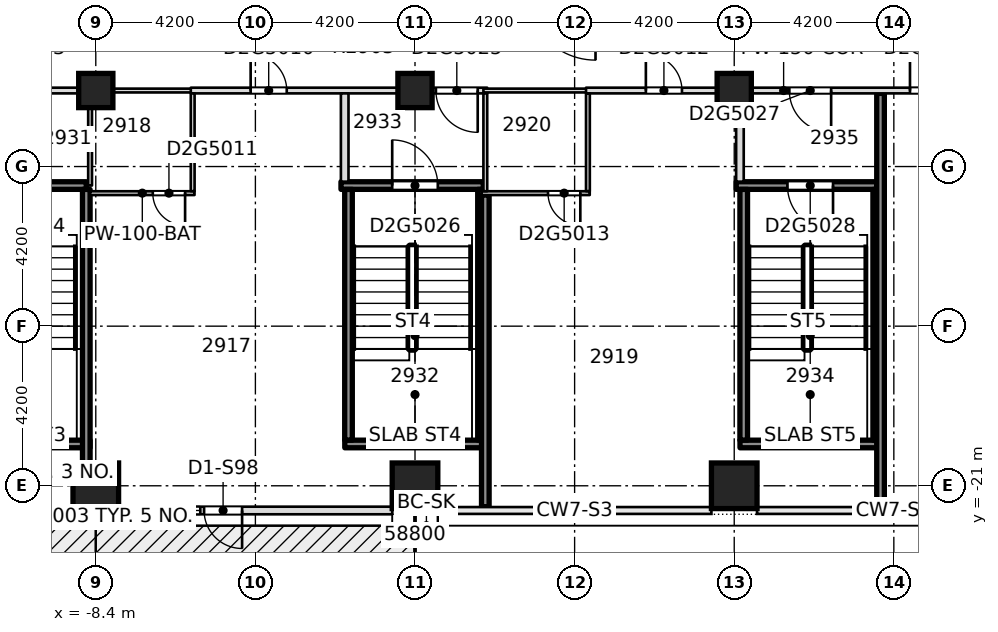
"""IFC4 building model, lengths in metres.
Left out: names, types, materials, properties, quantities, classifications, styles, units other than length and angle.
Written with IfcOpenShell. Run it as: python <this file> out.ifc"""

import sys

from ifc_helpers import new_model, si_unit, direction, frame, frame_2d, origin, origin_2d, place, context, subcontext, project, spatial, rectangle, extrude, element, fill, save


model = new_model("IFC4")
c1 = context("Model", 3, precision=1e-05, world=origin(), true_north=direction((0.0, 1.0)))
c2 = subcontext(c1, "Body", "Model", "MODEL_VIEW")
j1 = project(units=[si_unit("LENGTHUNIT", "METRE"), si_unit("PLANEANGLEUNIT", "RADIAN")], contexts=[c1])
p1 = place(None, origin())
s1 = spatial("IfcSite", under=j1, at=p1, CompositionType="ELEMENT")
p2 = place(p1, origin())
s2 = spatial("IfcBuilding", under=s1, at=p2, CompositionType="ELEMENT")
p3 = place(p2, frame((0.0, 0.0, 114.9)))
s3 = spatial("IfcBuildingStorey", under=s2, at=p3, CompositionType="ELEMENT", Elevation=114.9)
for number, where, z_axis, x_axis in (
    (1, (-8.4, -21.0, -0.32), (0.0, 0.0, 1.0), (1.0, 0.0, 0.0)),
    (2, (0.0, -21.0, -0.32), (0.0, 0.0, 1.0), (1.0, 0.0, 0.0)),
    (3, (8.4, -21.0, -0.32), (0.0, 0.0, 1.0), (1.0, 0.0, 0.0)),
):
    element("IfcColumn", number, at=place(p3, frame(where, z_axis=z_axis, x_axis=x_axis)), inside=s3, PredefinedType="COLUMN", context=c2, shape_type="SweptSolid", body=[
        extrude(rectangle(XDim=1.2, YDim=1.2, at=origin_2d()), origin(), (0.0, 0.0, 1.0), 3.45),
    ])
for number, where, z_axis, x_axis in (
    (4, (-8.4, -10.6, -0.32), (0.0, 0.0, 1.0), (1.0, 0.0, 0.0)),
    (5, (0.0, -10.6, -0.32), (0.0, 0.0, 1.0), (1.0, 0.0, 0.0)),
    (6, (8.4, -10.6, -0.32), (0.0, 0.0, 1.0), (1.0, 0.0, 0.0)),
):
    element("IfcColumn", number, at=place(p3, frame(where, z_axis=z_axis, x_axis=x_axis)), inside=s3, PredefinedType="COLUMN", context=c2, shape_type="SweptSolid", body=[
        extrude(rectangle(XDim=0.9, YDim=0.9, at=origin_2d()), origin(), (0.0, 0.0, 1.0), 3.45),
    ])
p4 = place(p3, frame((-1.848, -19.9, 0.0), z_axis=(0.0, 0.0, 1.0), x_axis=(1.0, 0.0, 0.0)))
e7 = element("IfcWall", 7, at=p4, inside=s3, PredefinedType="SOLIDWALL", context=c2, shape_type="SweptSolid", body=[
    extrude(rectangle(XDim=3.696, YDim=0.2, at=frame_2d((1.848, 0.0))), origin(), (0.0, 0.0, 1.0), 3.13),
])
p5 = place(p3, frame((8.552, -19.9, 0.0), z_axis=(0.0, 0.0, 1.0), x_axis=(1.0, 0.0, 0.0)))
e8 = element("IfcWall", 8, at=p5, inside=s3, PredefinedType="SOLIDWALL", context=c2, shape_type="SweptSolid", body=[
    extrude(rectangle(XDim=3.696, YDim=0.2, at=frame_2d((1.848, 0.0))), origin(), (0.0, 0.0, 1.0), 3.13),
])
p6 = place(p3, frame((-8.55, -13.3, 0.0), z_axis=(0.0, 0.0, 1.0), x_axis=(1.0, 0.0, 0.0)))
e9 = element("IfcWall", 9, at=p6, inside=s3, PredefinedType="PARTITIONING", context=c2, shape_type="SweptSolid", body=[
    extrude(rectangle(XDim=2.748, YDim=0.1, at=frame_2d((1.374, 0.0))), origin(), (0.0, 0.0, 1.0), 3.13),
])
p7 = place(p6, frame((1.65, 0.0, 0.0)))
e10 = element("IfcOpeningElement", 10, at=p7, cuts=e9, PredefinedType="OPENING", context=c2, shape_type="SweptSolid", body=[
    extrude(rectangle(XDim=0.85, YDim=2.1, at=frame_2d((0.425, 1.05))), frame((0.0, 0.06, 0.0), z_axis=(0.0, -1.0, 0.0), x_axis=(1.0, 0.0, 0.0)), (0.0, 0.0, 1.0), 0.12),
])
p8 = place(p3, frame((1.75, -13.3, 0.0), z_axis=(0.0, 0.0, 1.0), x_axis=(1.0, 0.0, 0.0)))
e11 = element("IfcWall", 11, at=p8, inside=s3, PredefinedType="PARTITIONING", context=c2, shape_type="SweptSolid", body=[
    extrude(rectangle(XDim=2.848, YDim=0.1, at=frame_2d((1.424, 0.0))), origin(), (0.0, 0.0, 1.0), 3.13),
])
p9 = place(p8, frame((1.75, 0.0, 0.0)))
e12 = element("IfcOpeningElement", 12, at=p9, cuts=e11, PredefinedType="OPENING", context=c2, shape_type="SweptSolid", body=[
    extrude(rectangle(XDim=0.85, YDim=2.1, at=frame_2d((0.425, 1.05))), frame((0.0, 0.06, 0.0), z_axis=(0.0, -1.0, 0.0), x_axis=(1.0, 0.0, 0.0)), (0.0, 0.0, 1.0), 0.12),
])
p10 = place(p3, frame((-12.15, -13.1, 0.0), z_axis=(0.0, 0.0, 1.0), x_axis=(1.0, 0.0, 0.0)))
e13 = element("IfcWall", 13, at=p10, inside=s3, PredefinedType="SOLIDWALL", context=c2, shape_type="SweptSolid", body=[
    extrude(rectangle(XDim=3.5, YDim=0.2, at=frame_2d((1.75, 0.0))), origin(), (0.0, 0.0, 1.0), 3.13),
])
p11 = place(p10, frame((1.15, 0.0, 0.0)))
e14 = element("IfcOpeningElement", 14, at=p11, cuts=e13, PredefinedType="OPENING", context=c2, shape_type="SweptSolid", body=[
    extrude(rectangle(XDim=1.2, YDim=2.1, at=frame_2d((0.6, 1.05))), frame((0.0, 0.11, 0.0), z_axis=(0.0, -1.0, 0.0), x_axis=(1.0, 0.0, 0.0)), (0.0, 0.0, 1.0), 0.22),
])
p12 = place(p3, frame((-1.948, -13.1, 0.0), z_axis=(0.0, 0.0, 1.0), x_axis=(1.0, 0.0, 0.0)))
e15 = element("IfcWall", 15, at=p12, inside=s3, PredefinedType="SOLIDWALL", context=c2, shape_type="SweptSolid", body=[
    extrude(rectangle(XDim=3.746, YDim=0.2, at=frame_2d((1.873, 0.0))), origin(), (0.0, 0.0, 1.0), 3.13),
])
p13 = place(p12, frame((1.348, 0.0, 0.0)))
e16 = element("IfcOpeningElement", 16, at=p13, cuts=e15, PredefinedType="OPENING", context=c2, shape_type="SweptSolid", body=[
    extrude(rectangle(XDim=1.2, YDim=2.1, at=frame_2d((0.6, 1.05))), frame((0.0, 0.11, 0.0), z_axis=(0.0, -1.0, 0.0), x_axis=(1.0, 0.0, 0.0)), (0.0, 0.0, 1.0), 0.22),
])
p14 = place(p3, frame((8.452, -13.1, 0.0), z_axis=(0.0, 0.0, 1.0), x_axis=(1.0, 0.0, 0.0)))
e17 = element("IfcWall", 17, at=p14, inside=s3, PredefinedType="SOLIDWALL", context=c2, shape_type="SweptSolid", body=[
    extrude(rectangle(XDim=3.696, YDim=0.2, at=frame_2d((1.848, 0.0))), origin(), (0.0, 0.0, 1.0), 3.13),
])
p15 = place(p14, frame((1.348, 0.0, 0.0)))
e18 = element("IfcOpeningElement", 18, at=p15, cuts=e17, PredefinedType="OPENING", context=c2, shape_type="SweptSolid", body=[
    extrude(rectangle(XDim=1.2, YDim=2.1, at=frame_2d((0.6, 1.05))), frame((0.0, 0.11, 0.0), z_axis=(0.0, -1.0, 0.0), x_axis=(1.0, 0.0, 0.0)), (0.0, 0.0, 1.0), 0.22),
])
p16 = place(p3, frame((-12.25, -10.6, 0.0), z_axis=(0.0, 0.0, 1.0), x_axis=(1.0, 0.0, 0.0)))
e19 = element("IfcWall", 19, at=p16, inside=s3, PredefinedType="PARTITIONING", context=c2, shape_type="SweptSolid", body=[
    extrude(rectangle(XDim=3.75, YDim=0.15, at=frame_2d((1.875, 0.0))), origin(), (0.0, 0.0, 1.0), 3.13),
])
p17 = place(p16, frame((1.3, 0.0, 0.0)))
e20 = element("IfcOpeningElement", 20, at=p17, cuts=e19, PredefinedType="OPENING", context=c2, shape_type="SweptSolid", body=[
    extrude(rectangle(XDim=1.1, YDim=2.1, at=frame_2d((0.55, 1.05))), frame((0.0, 0.085, 0.0), z_axis=(0.0, -1.0, 0.0), x_axis=(1.0, 0.0, 0.0)), (0.0, 0.0, 1.0), 0.17),
])
p18 = place(p3, frame((-8.6, -10.6, 0.0), z_axis=(0.0, 0.0, 1.0), x_axis=(1.0, 0.0, 0.0)))
e21 = element("IfcWall", 21, at=p18, inside=s3, PredefinedType="PARTITIONING", context=c2, shape_type="SweptSolid", body=[
    extrude(rectangle(XDim=2.8, YDim=0.1, at=frame_2d((1.4, 0.0))), origin(), (0.0, 0.0, 1.0), 3.13),
])
p19 = place(p3, frame((-5.9, -10.6, 0.0), z_axis=(0.0, 0.0, 1.0), x_axis=(1.0, 0.0, 0.0)))
e22 = element("IfcWall", 22, at=p19, inside=s3, PredefinedType="PARTITIONING", context=c2, shape_type="SweptSolid", body=[
    extrude(rectangle(XDim=7.8, YDim=0.15, at=frame_2d((3.9, 0.0))), origin(), (0.0, 0.0, 1.0), 3.13),
])
p20 = place(p19, frame((1.575, 0.0, 0.0)))
e23 = element("IfcOpeningElement", 23, at=p20, cuts=e22, PredefinedType="OPENING", context=c2, shape_type="SweptSolid", body=[
    extrude(rectangle(XDim=0.95, YDim=2.1, at=frame_2d((0.475, 1.05))), frame((0.0, 0.085, 0.0), z_axis=(0.0, -1.0, 0.0), x_axis=(1.0, 0.0, 0.0)), (0.0, 0.0, 1.0), 0.17),
])
p21 = place(p19, frame((6.45, 0.0, 0.0)))
e24 = element("IfcOpeningElement", 24, at=p21, cuts=e22, PredefinedType="OPENING", context=c2, shape_type="SweptSolid", body=[
    extrude(rectangle(XDim=1.1, YDim=2.1, at=frame_2d((0.55, 1.05))), frame((0.0, 0.085, 0.0), z_axis=(0.0, -1.0, 0.0), x_axis=(1.0, 0.0, 0.0)), (0.0, 0.0, 1.0), 0.17),
])
p22 = place(p3, frame((1.8, -10.6, 0.0), z_axis=(0.0, 0.0, 1.0), x_axis=(1.0, 0.0, 0.0)))
e25 = element("IfcWall", 25, at=p22, inside=s3, PredefinedType="PARTITIONING", context=c2, shape_type="SweptSolid", body=[
    extrude(rectangle(XDim=2.8, YDim=0.1, at=frame_2d((1.4, 0.0))), origin(), (0.0, 0.0, 1.0), 3.13),
])
p23 = place(p3, frame((4.5, -10.6, 0.0), z_axis=(0.0, 0.0, 1.0), x_axis=(1.0, 0.0, 0.0)))
e26 = element("IfcWall", 26, at=p23, inside=s3, PredefinedType="PARTITIONING", context=c2, shape_type="SweptSolid", body=[
    extrude(rectangle(XDim=10.4, YDim=0.15, at=frame_2d((5.2, 0.0))), origin(), (0.0, 0.0, 1.0), 3.13),
])
p24 = place(p23, frame((1.575, 0.0, 0.0)))
e27 = element("IfcOpeningElement", 27, at=p24, cuts=e26, PredefinedType="OPENING", context=c2, shape_type="SweptSolid", body=[
    extrude(rectangle(XDim=0.95, YDim=2.1, at=frame_2d((0.475, 1.05))), frame((0.0, 0.085, 0.0), z_axis=(0.0, -1.0, 0.0), x_axis=(1.0, 0.0, 0.0)), (0.0, 0.0, 1.0), 0.17),
])
p25 = place(p23, frame((5.35, 0.0, 0.0)))
e28 = element("IfcOpeningElement", 28, at=p25, cuts=e26, PredefinedType="OPENING", context=c2, shape_type="SweptSolid", body=[
    extrude(rectangle(XDim=1.1, YDim=2.1, at=frame_2d((0.55, 1.05))), frame((0.0, 0.085, 0.0), z_axis=(0.0, -1.0, 0.0), x_axis=(1.0, 0.0, 0.0)), (0.0, 0.0, 1.0), 0.17),
])
p26 = place(p23, frame((8.525, 0.0, 0.0)))
e29 = element("IfcOpeningElement", 29, at=p26, cuts=e26, PredefinedType="OPENING", context=c2, shape_type="SweptSolid", body=[
    extrude(rectangle(XDim=1.0, YDim=2.1, at=frame_2d((0.5, 1.05))), frame((0.0, 0.085, 0.0), z_axis=(0.0, -1.0, 0.0), x_axis=(1.0, 0.0, 0.0)), (0.0, 0.0, 1.0), 0.17),
])
p27 = place(p3, frame((-8.55, -13.1, 0.0), z_axis=(0.0, 0.0, 1.0), x_axis=(0.0, 1.0, 0.0)))
e30 = element("IfcWall", 30, at=p27, inside=s3, PredefinedType="PARTITIONING", context=c2, shape_type="SweptSolid", body=[
    extrude(rectangle(XDim=2.425, YDim=0.1, at=frame_2d((1.212, 0.0))), origin(), (0.0, 0.0, 1.0), 3.13),
])
p28 = place(p3, frame((-5.85, -13.248, 0.0), z_axis=(0.0, 0.0, 1.0), x_axis=(0.0, 1.0, 0.0)))
e31 = element("IfcWall", 31, at=p28, inside=s3, PredefinedType="PARTITIONING", context=c2, shape_type="SweptSolid", body=[
    extrude(rectangle(XDim=2.573, YDim=0.1, at=frame_2d((1.287, 0.0))), origin(), (0.0, 0.0, 1.0), 3.13),
])
p29 = place(p3, frame((-1.85, -12.998, 0.0), z_axis=(0.0, 0.0, 1.0), x_axis=(0.0, 1.0, 0.0)))
e32 = element("IfcWall", 32, at=p29, inside=s3, PredefinedType="PARTITIONING", context=c2, shape_type="SweptSolid", body=[
    extrude(rectangle(XDim=2.323, YDim=0.2, at=frame_2d((1.162, 0.0))), origin(), (0.0, 0.0, 1.0), 3.13),
])
for number, where, z_axis, x_axis in (
    (33, (-1.75, -19.798, 0.0), (0.0, 0.0, 1.0), (0.0, 1.0, 0.0)),
    (34, (1.75, -19.798, 0.0), (0.0, 0.0, 1.0), (0.0, 1.0, 0.0)),
):
    element("IfcWall", number, at=place(p3, frame(where, z_axis=z_axis, x_axis=x_axis)), inside=s3, PredefinedType="SOLIDWALL", context=c2, shape_type="SweptSolid", body=[
        extrude(rectangle(XDim=6.596, YDim=0.2, at=frame_2d((3.298, 0.0))), origin(), (0.0, 0.0, 1.0), 3.13),
    ])
p30 = place(p3, frame((1.85, -13.25, 0.0), z_axis=(0.0, 0.0, 1.0), x_axis=(0.0, 1.0, 0.0)))
e35 = element("IfcWall", 35, at=p30, inside=s3, PredefinedType="PARTITIONING", context=c2, shape_type="SweptSolid", body=[
    extrude(rectangle(XDim=2.575, YDim=0.1, at=frame_2d((1.288, 0.0))), origin(), (0.0, 0.0, 1.0), 3.13),
])
p31 = place(p3, frame((4.55, -13.248, 0.0), z_axis=(0.0, 0.0, 1.0), x_axis=(0.0, 1.0, 0.0)))
e36 = element("IfcWall", 36, at=p31, inside=s3, PredefinedType="PARTITIONING", context=c2, shape_type="SweptSolid", body=[
    extrude(rectangle(XDim=2.573, YDim=0.1, at=frame_2d((1.287, 0.0))), origin(), (0.0, 0.0, 1.0), 3.13),
])
p32 = place(p3, frame((8.55, -12.998, 0.0), z_axis=(0.0, 0.0, 1.0), x_axis=(0.0, 1.0, 0.0)))
e37 = element("IfcWall", 37, at=p32, inside=s3, PredefinedType="PARTITIONING", context=c2, shape_type="SweptSolid", body=[
    extrude(rectangle(XDim=2.323, YDim=0.2, at=frame_2d((1.162, 0.0))), origin(), (0.0, 0.0, 1.0), 3.13),
])
for number, where, z_axis, x_axis in (
    (38, (8.65, -19.798, 0.0), (0.0, 0.0, 1.0), (0.0, 1.0, 0.0)),
    (39, (12.15, -19.798, 0.0), (0.0, 0.0, 1.0), (0.0, 1.0, 0.0)),
):
    element("IfcWall", number, at=place(p3, frame(where, z_axis=z_axis, x_axis=x_axis)), inside=s3, PredefinedType="SOLIDWALL", context=c2, shape_type="SweptSolid", body=[
        extrude(rectangle(XDim=6.596, YDim=0.2, at=frame_2d((3.298, 0.0))), origin(), (0.0, 0.0, 1.0), 3.13),
    ])
p33 = place(p3, frame((-16.2, -21.65, 0.0), z_axis=(0.0, 0.0, 1.0), x_axis=(1.0, 0.0, 0.0)))
e40 = element("IfcWall", 40, at=p33, inside=s3, PredefinedType="STANDARD", context=c2, shape_type="SweptSolid", body=[
    extrude(rectangle(XDim=7.2, YDim=0.2, at=frame_2d((3.6, 0.0))), origin(), (0.0, 0.0, 1.0), 3.13),
])
p34 = place(p33, frame((0.35, 0.0, 0.2)))
e41 = element("IfcOpeningElement", 41, at=p34, cuts=e40, PredefinedType="OPENING", context=c2, shape_type="SweptSolid", body=[
    extrude(rectangle(XDim=1.8, YDim=2.65, at=frame_2d((0.9, 1.325))), frame((0.0, 0.11, 0.0), z_axis=(0.0, -1.0, 0.0), x_axis=(1.0, 0.0, 0.0)), (0.0, 0.0, 1.0), 0.22),
])
p35 = place(p33, frame((2.25, 0.0, 0.0)))
e42 = element("IfcOpeningElement", 42, at=p35, cuts=e40, PredefinedType="OPENING", context=c2, shape_type="SweptSolid", body=[
    extrude(rectangle(XDim=1.0, YDim=2.4, at=frame_2d((0.5, 1.2))), frame((0.0, 0.11, 0.0), z_axis=(0.0, -1.0, 0.0), x_axis=(1.0, 0.0, 0.0)), (0.0, 0.0, 1.0), 0.22),
])
p36 = place(p3, frame((-7.8, -21.65, 0.0), z_axis=(0.0, 0.0, 1.0), x_axis=(1.0, 0.0, 0.0)))
e43 = element("IfcWall", 43, at=p36, inside=s3, PredefinedType="STANDARD", context=c2, shape_type="SweptSolid", body=[
    extrude(rectangle(XDim=7.2, YDim=0.2, at=frame_2d((3.6, 0.0))), origin(), (0.0, 0.0, 1.0), 3.13),
])
p37 = place(p36, frame((0.35, 0.0, 0.2)))
e44 = element("IfcOpeningElement", 44, at=p37, cuts=e43, PredefinedType="OPENING", context=c2, shape_type="SweptSolid", body=[
    extrude(rectangle(XDim=1.8, YDim=2.65, at=frame_2d((0.9, 1.325))), frame((0.0, 0.11, 0.0), z_axis=(0.0, -1.0, 0.0), x_axis=(1.0, 0.0, 0.0)), (0.0, 0.0, 1.0), 0.22),
])
p38 = place(p36, frame((2.25, 0.0, 0.0)))
e45 = element("IfcOpeningElement", 45, at=p38, cuts=e43, PredefinedType="OPENING", context=c2, shape_type="SweptSolid", body=[
    extrude(rectangle(XDim=1.0, YDim=2.4, at=frame_2d((0.5, 1.2))), frame((0.0, 0.11, 0.0), z_axis=(0.0, -1.0, 0.0), x_axis=(1.0, 0.0, 0.0)), (0.0, 0.0, 1.0), 0.22),
])
p39 = place(p3, frame((-12.25, -19.9, 0.0), z_axis=(0.0, 0.0, 1.0), x_axis=(1.0, 0.0, 0.0)))
e46 = element("IfcWall", 46, at=p39, inside=s3, PredefinedType="SOLIDWALL", context=c2, shape_type="SweptSolid", body=[
    extrude(rectangle(XDim=3.7, YDim=0.2, at=frame_2d((1.85, 0.0))), origin(), (0.0, 0.0, 1.0), 3.13),
])
p40 = place(p3, frame((1.85, -21.55, 0.0), z_axis=(0.0, 0.0, 1.0), x_axis=(0.0, 1.0, 0.0)))
e47 = element("IfcWall", 47, at=p40, inside=s3, PredefinedType="SOLIDWALL", context=c2, shape_type="SweptSolid", body=[
    extrude(rectangle(XDim=8.2, YDim=0.2, at=frame_2d((4.1, 0.0))), origin(), (0.0, 0.0, 1.0), 3.13),
])
p41 = place(p3, frame((12.25, -21.55, 0.0), z_axis=(0.0, 0.0, 1.0), x_axis=(0.0, 1.0, 0.0)))
e48 = element("IfcWall", 48, at=p41, inside=s3, PredefinedType="SOLIDWALL", context=c2, shape_type="SweptSolid", body=[
    extrude(rectangle(XDim=10.875, YDim=0.2, at=frame_2d((5.438, 0.0))), origin(), (0.0, 0.0, 1.0), 3.13),
])
p42 = place(p3, frame((-8.65, -20.4, 0.0), z_axis=(0.0, 0.0, 1.0), x_axis=(0.0, 1.0, 0.0)))
e49 = element("IfcWall", 49, at=p42, inside=s3, PredefinedType="SOLIDWALL", context=c2, shape_type="SweptSolid", body=[
    extrude(rectangle(XDim=7.198, YDim=0.2, at=frame_2d((3.599, 0.0))), origin(), (0.0, 0.0, 1.0), 3.13),
])
p43 = place(p20, origin())
e50 = element("IfcDoor", 50, at=p43, inside=s3, OperationType="SINGLE_SWING_LEFT", PredefinedType="DOOR", context=c2, shape_type="SweptSolid", body=[
    extrude(rectangle(XDim=0.95, YDim=2.1, at=frame_2d((0.475, 1.05))), frame((0.0, 0.025, 0.0), z_axis=(0.0, -1.0, 0.0), x_axis=(1.0, 0.0, 0.0)), (0.0, 0.0, 1.0), 0.05),
])
fill(e23, e50)
p44 = place(p7, origin())
e51 = element("IfcDoor", 51, at=p44, inside=s3, OperationType="SINGLE_SWING_RIGHT", PredefinedType="DOOR", context=c2, shape_type="SweptSolid", body=[
    extrude(rectangle(XDim=0.85, YDim=2.1, at=frame_2d((0.425, 1.05))), frame((0.0, 0.025, 0.0), z_axis=(0.0, -1.0, 0.0), x_axis=(1.0, 0.0, 0.0)), (0.0, 0.0, 1.0), 0.05),
])
fill(e10, e51)
p45 = place(p24, origin())
e52 = element("IfcDoor", 52, at=p45, inside=s3, OperationType="SINGLE_SWING_LEFT", PredefinedType="DOOR", context=c2, shape_type="SweptSolid", body=[
    extrude(rectangle(XDim=0.95, YDim=2.1, at=frame_2d((0.475, 1.05))), frame((0.0, 0.025, 0.0), z_axis=(0.0, -1.0, 0.0), x_axis=(1.0, 0.0, 0.0)), (0.0, 0.0, 1.0), 0.05),
])
fill(e27, e52)
p46 = place(p9, origin())
e53 = element("IfcDoor", 53, at=p46, inside=s3, OperationType="SINGLE_SWING_RIGHT", PredefinedType="DOOR", context=c2, shape_type="SweptSolid", body=[
    extrude(rectangle(XDim=0.85, YDim=2.1, at=frame_2d((0.425, 1.05))), frame((0.0, 0.025, 0.0), z_axis=(0.0, -1.0, 0.0), x_axis=(1.0, 0.0, 0.0)), (0.0, 0.0, 1.0), 0.05),
])
fill(e12, e53)
p47 = place(p21, origin())
e54 = element("IfcDoor", 54, at=p47, inside=s3, OperationType="SINGLE_SWING_LEFT", PredefinedType="DOOR", context=c2, shape_type="SweptSolid", body=[
    extrude(rectangle(XDim=1.1, YDim=2.1, at=frame_2d((0.55, 1.05))), frame((0.0, 0.025, 0.0), z_axis=(0.0, -1.0, 0.0), x_axis=(1.0, 0.0, 0.0)), (0.0, 0.0, 1.0), 0.05),
])
fill(e24, e54)
p48 = place(p13, origin())
e55 = element("IfcDoor", 55, at=p48, inside=s3, OperationType="SINGLE_SWING_RIGHT", PredefinedType="DOOR", context=c2, shape_type="SweptSolid", body=[
    extrude(rectangle(XDim=1.2, YDim=2.1, at=frame_2d((0.6, 1.05))), frame((0.0, 0.025, 0.0), z_axis=(0.0, -1.0, 0.0), x_axis=(1.0, 0.0, 0.0)), (0.0, 0.0, 1.0), 0.05),
])
fill(e16, e55)
p49 = place(p25, origin())
e56 = element("IfcDoor", 56, at=p49, inside=s3, OperationType="SINGLE_SWING_LEFT", PredefinedType="DOOR", context=c2, shape_type="SweptSolid", body=[
    extrude(rectangle(XDim=1.1, YDim=2.1, at=frame_2d((0.55, 1.05))), frame((0.0, 0.025, 0.0), z_axis=(0.0, -1.0, 0.0), x_axis=(1.0, 0.0, 0.0)), (0.0, 0.0, 1.0), 0.05),
])
fill(e28, e56)
p50 = place(p15, origin())
e57 = element("IfcDoor", 57, at=p50, inside=s3, OperationType="SINGLE_SWING_RIGHT", PredefinedType="DOOR", context=c2, shape_type="SweptSolid", body=[
    extrude(rectangle(XDim=1.2, YDim=2.1, at=frame_2d((0.6, 1.05))), frame((0.0, 0.025, 0.0), z_axis=(0.0, -1.0, 0.0), x_axis=(1.0, 0.0, 0.0)), (0.0, 0.0, 1.0), 0.05),
])
fill(e18, e57)
p51 = place(p26, origin())
e58 = element("IfcDoor", 58, at=p51, inside=s3, OperationType="SINGLE_SWING_LEFT", PredefinedType="DOOR", context=c2, shape_type="SweptSolid", body=[
    extrude(rectangle(XDim=1.0, YDim=2.1, at=frame_2d((0.5, 1.05))), frame((0.0, 0.025, 0.0), z_axis=(0.0, -1.0, 0.0), x_axis=(1.0, 0.0, 0.0)), (0.0, 0.0, 1.0), 0.05),
])
fill(e29, e58)
p52 = place(p37, origin())
e59 = element("IfcWindow", 59, at=p52, inside=s3, PartitioningType="SINGLE_PANEL", PredefinedType="WINDOW", context=c2, shape_type="SweptSolid", body=[
    extrude(rectangle(XDim=1.8, YDim=2.65, at=frame_2d((0.9, 1.325))), frame((0.0, 0.03, 0.0), z_axis=(0.0, -1.0, 0.0), x_axis=(1.0, 0.0, 0.0)), (0.0, 0.0, 1.0), 0.06),
])
fill(e44, e59)
p53 = place(p38, origin())
e60 = element("IfcDoor", 60, at=p53, inside=s3, OperationType="SINGLE_SWING_LEFT", PredefinedType="DOOR", context=c2, shape_type="SweptSolid", body=[
    extrude(rectangle(XDim=1.0, YDim=2.4, at=frame_2d((0.5, 1.2))), frame((0.0, 0.025, 0.0), z_axis=(0.0, -1.0, 0.0), x_axis=(1.0, 0.0, 0.0)), (0.0, 0.0, 1.0), 0.05),
])
fill(e45, e60)
save(model, sys.argv[1])
